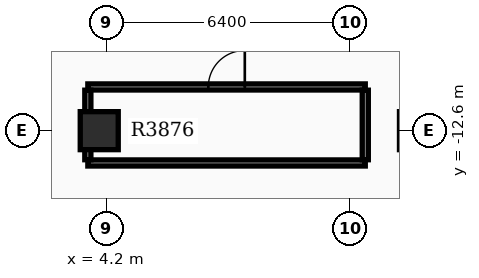
"""IFC4 building model, lengths in metres.
Left out: names, types, materials, properties, quantities, classifications, styles, units other than length and angle.
Written with IfcOpenShell. Run it as: python <this file> out.ifc"""

import sys

from ifc_helpers import new_model, si_unit, direction, frame, frame_2d, origin, origin_2d, place, context, subcontext, project, spatial, rectangle, extrude, element, fill, save


model = new_model("IFC4")
c1 = context("Model", 3, precision=1e-05, world=origin(), true_north=direction((0.0, 1.0)))
c2 = subcontext(c1, "Body", "Model", "MODEL_VIEW")
j1 = project(units=[si_unit("LENGTHUNIT", "METRE"), si_unit("PLANEANGLEUNIT", "RADIAN")], contexts=[c1])
p1 = place(None, origin())
s1 = spatial("IfcSite", under=j1, at=p1, CompositionType="ELEMENT")
p2 = place(p1, origin())
s2 = spatial("IfcBuilding", under=s1, at=p2, CompositionType="ELEMENT")
p3 = place(p2, frame((0.0, 0.0, 245.4)))
s3 = spatial("IfcBuildingStorey", under=s2, at=p3, CompositionType="ELEMENT", Elevation=245.4)
for number, where, z_axis, x_axis in (
    (1, (12.4, -12.6, 0.0), (0.0, 0.0, 1.0), (1.0, 0.0, 0.0)),
    (2, (4.0, -12.6, 0.0), (0.0, 0.0, 1.0), (1.0, 0.0, 0.0)),
):
    element("IfcColumn", number, at=place(p3, frame(where, z_axis=z_axis, x_axis=x_axis)), inside=s3, PredefinedType="COLUMN", context=c2, shape_type="SweptSolid", body=[
        extrude(rectangle(XDim=1.0, YDim=1.0, at=origin_2d()), origin(), (0.0, 0.0, 1.0), 4.5),
    ])
p4 = place(p3, frame((3.7, -13.45, 0.0), z_axis=(0.0, 0.0, 1.0), x_axis=(1.0, 0.0, 0.0)))
e3 = element("IfcWall", 3, at=p4, inside=s3, PredefinedType="PARTITIONING", context=c2, shape_type="SweptSolid", body=[
    extrude(rectangle(XDim=7.3, YDim=0.16, at=frame_2d((3.65, 0.0))), origin(), (0.0, 0.0, 1.0), 3.37),
])
p5 = place(p3, frame((3.7, -11.45, 0.0), z_axis=(0.0, 0.0, 1.0), x_axis=(1.0, 0.0, 0.0)))
e4 = element("IfcWall", 4, at=p5, inside=s3, PredefinedType="PARTITIONING", context=c2, shape_type="SweptSolid", body=[
    extrude(rectangle(XDim=7.3, YDim=0.16, at=frame_2d((3.65, 0.0))), origin(), (0.0, 0.0, 1.0), 3.37),
])
p6 = place(p5, frame((3.17, 0.0, 0.0)))
e5 = element("IfcOpeningElement", 5, at=p6, cuts=e4, PredefinedType="OPENING", context=c2, shape_type="SweptSolid", body=[
    extrude(rectangle(XDim=0.96, YDim=2.15, at=frame_2d((0.48, 1.075))), frame((0.0, 0.09, 0.0), z_axis=(0.0, -1.0, 0.0), x_axis=(1.0, 0.0, 0.0)), (0.0, 0.0, 1.0), 0.18),
])
for number, where, z_axis, x_axis in (
    (6, (3.7, -13.365, 0.0), (0.0, 0.0, 1.0), (0.0, 1.0, 0.0)),
    (7, (11.0, -13.365, 0.0), (0.0, 0.0, 1.0), (0.0, 1.0, 0.0)),
):
    element("IfcWall", number, at=place(p3, frame(where, z_axis=z_axis, x_axis=x_axis)), inside=s3, PredefinedType="PARTITIONING", context=c2, shape_type="SweptSolid", body=[
        extrude(rectangle(XDim=1.83, YDim=0.16, at=frame_2d((0.915, 0.0))), origin(), (0.0, 0.0, 1.0), 3.37),
    ])
p7 = place(p6, origin())
e8 = element("IfcDoor", 8, at=p7, inside=s3, OperationType="SINGLE_SWING_RIGHT", PredefinedType="DOOR", context=c2, shape_type="SweptSolid", body=[
    extrude(rectangle(XDim=0.96, YDim=2.15, at=frame_2d((0.48, 1.075))), frame((0.0, 0.025, 0.0), z_axis=(0.0, -1.0, 0.0), x_axis=(1.0, 0.0, 0.0)), (0.0, 0.0, 1.0), 0.05),
])
fill(e5, e8)
save(model, sys.argv[1])
